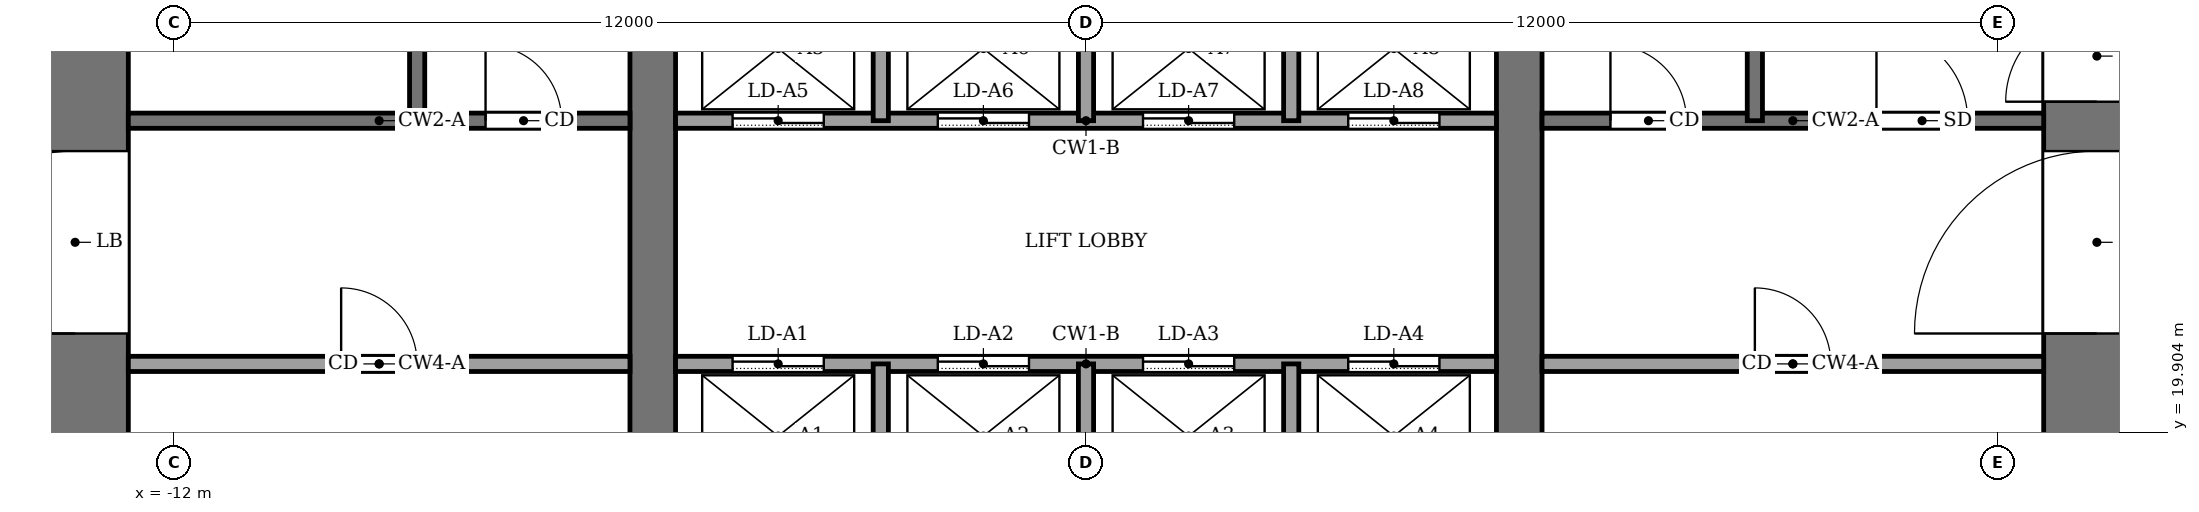
"""IFC4 building model, lengths in metres.
Left out: names, types, materials, properties, quantities, classifications, styles, units other than length and angle.
Written with IfcOpenShell. Run it as: python <this file> out.ifc"""

import sys

from ifc_helpers import new_model, si_unit, direction, frame, frame_2d, origin, place, context, subcontext, project, spatial, rectangle, extrude, element, fill, save


model = new_model("IFC4")
c1 = context("Model", 3, precision=1e-05, world=origin(), true_north=direction((0.0, 1.0)))
c2 = subcontext(c1, "Body", "Model", "MODEL_VIEW")
j1 = project(units=[si_unit("LENGTHUNIT", "METRE"), si_unit("PLANEANGLEUNIT", "RADIAN")], contexts=[c1])
p1 = place(None, origin())
s1 = spatial("IfcSite", under=j1, at=p1, CompositionType="ELEMENT")
p2 = place(p1, origin())
s2 = spatial("IfcBuilding", under=s1, at=p2, CompositionType="ELEMENT")
p3 = place(p2, origin())
s3 = spatial("IfcBuildingStorey", under=s2, at=p3, CompositionType="ELEMENT", Elevation=0.0)
p4 = place(p3, frame((-13.3, 18.4, -0.45), z_axis=(0.0, 0.0, 1.0), x_axis=(0.0, 1.0, 0.0)))
e1 = element("IfcWall", 1, at=p4, inside=s3, PredefinedType="SHEAR", context=c2, shape_type="SweptSolid", body=[
    extrude(rectangle(XDim=19.2, YDim=1.4, at=frame_2d((9.6, 0.0))), origin(), (0.0, 0.0, 1.0), 9.32),
])
p5 = place(p4, frame((2.8, 0.0, 0.45)))
e2 = element("IfcOpeningElement", 2, at=p5, cuts=e1, PredefinedType="OPENING", context=c2, shape_type="SweptSolid", body=[
    extrude(rectangle(XDim=2.4, YDim=2.4, at=frame_2d((1.2, 1.2))), frame((0.0, 0.71, 0.0), z_axis=(0.0, -1.0, 0.0), x_axis=(1.0, 0.0, 0.0)), (0.0, 0.0, 1.0), 1.42),
])
p6 = place(p4, frame((13.4, 0.0, 0.45)))
e3 = element("IfcOpeningElement", 3, at=p6, cuts=e1, PredefinedType="OPENING", context=c2, shape_type="SweptSolid", body=[
    extrude(rectangle(XDim=1.4, YDim=2.2, at=frame_2d((0.7, 1.1))), frame((0.0, 0.71, 0.0), z_axis=(0.0, -1.0, 0.0), x_axis=(1.0, 0.0, 0.0)), (0.0, 0.0, 1.0), 1.42),
])
p7 = place(p4, frame((11.3, 0.0, 0.45)))
e4 = element("IfcOpeningElement", 4, at=p7, cuts=e1, PredefinedType="OPENING", context=c2, shape_type="SweptSolid", body=[
    extrude(rectangle(XDim=1.2, YDim=2.2, at=frame_2d((0.6, 1.1))), frame((0.0, 0.71, 0.0), z_axis=(0.0, -1.0, 0.0), x_axis=(1.0, 0.0, 0.0)), (0.0, 0.0, 1.0), 1.42),
])
p8 = place(p3, frame((13.3, 18.4, -0.45), z_axis=(0.0, 0.0, 1.0), x_axis=(0.0, 1.0, 0.0)))
e5 = element("IfcWall", 5, at=p8, inside=s3, PredefinedType="SHEAR", context=c2, shape_type="SweptSolid", body=[
    extrude(rectangle(XDim=19.2, YDim=1.4, at=frame_2d((9.6, 0.0))), origin(), (0.0, 0.0, 1.0), 9.32),
])
p9 = place(p8, frame((2.8, 0.0, 0.45)))
e6 = element("IfcOpeningElement", 6, at=p9, cuts=e5, PredefinedType="OPENING", context=c2, shape_type="SweptSolid", body=[
    extrude(rectangle(XDim=2.4, YDim=2.4, at=frame_2d((1.2, 1.2))), frame((0.0, 0.71, 0.0), z_axis=(0.0, -1.0, 0.0), x_axis=(1.0, 0.0, 0.0)), (0.0, 0.0, 1.0), 1.42),
])
p10 = place(p8, frame((13.3, 0.0, 0.45)))
e7 = element("IfcOpeningElement", 7, at=p10, cuts=e5, PredefinedType="OPENING", context=c2, shape_type="SweptSolid", body=[
    extrude(rectangle(XDim=2.4, YDim=2.4, at=frame_2d((1.2, 1.2))), frame((0.0, 0.71, 0.0), z_axis=(0.0, -1.0, 0.0), x_axis=(1.0, 0.0, 0.0)), (0.0, 0.0, 1.0), 1.42),
])
p11 = place(p8, frame((5.85, 0.0, 0.45)))
e8 = element("IfcOpeningElement", 8, at=p11, cuts=e5, PredefinedType="OPENING", context=c2, shape_type="SweptSolid", body=[
    extrude(rectangle(XDim=1.2, YDim=2.2, at=frame_2d((0.6, 1.1))), frame((0.0, 0.71, 0.0), z_axis=(0.0, -1.0, 0.0), x_axis=(1.0, 0.0, 0.0)), (0.0, 0.0, 1.0), 1.42),
])
p12 = place(p8, frame((16.8, 0.0, 0.45)))
e9 = element("IfcOpeningElement", 9, at=p12, cuts=e5, PredefinedType="OPENING", context=c2, shape_type="SweptSolid", body=[
    extrude(rectangle(XDim=1.2, YDim=2.2, at=frame_2d((0.6, 1.1))), frame((0.0, 0.71, 0.0), z_axis=(0.0, -1.0, 0.0), x_axis=(1.0, 0.0, 0.0)), (0.0, 0.0, 1.0), 1.42),
])
p13 = place(p3, frame((-5.7, 18.4, -0.45), z_axis=(0.0, 0.0, 1.0), x_axis=(0.0, 1.0, 0.0)))
e10 = element("IfcWall", 10, at=p13, inside=s3, PredefinedType="SHEAR", context=c2, shape_type="SweptSolid", body=[
    extrude(rectangle(XDim=19.2, YDim=0.6, at=frame_2d((9.6, 0.0))), origin(), (0.0, 0.0, 1.0), 9.32),
])
p14 = place(p13, frame((8.35, 0.0, 0.45)))
e11 = element("IfcOpeningElement", 11, at=p14, cuts=e10, PredefinedType="OPENING", context=c2, shape_type="SweptSolid", body=[
    extrude(rectangle(XDim=0.9, YDim=2.1, at=frame_2d((0.45, 1.05))), frame((0.0, 0.31, 0.0), z_axis=(0.0, -1.0, 0.0), x_axis=(1.0, 0.0, 0.0)), (0.0, 0.0, 1.0), 0.62),
])
p15 = place(p3, frame((5.7, 18.4, -0.45), z_axis=(0.0, 0.0, 1.0), x_axis=(0.0, 1.0, 0.0)))
e12 = element("IfcWall", 12, at=p15, inside=s3, PredefinedType="SHEAR", context=c2, shape_type="SweptSolid", body=[
    extrude(rectangle(XDim=19.2, YDim=0.6, at=frame_2d((9.6, 0.0))), origin(), (0.0, 0.0, 1.0), 9.32),
])
p16 = place(p15, frame((13.3, 0.0, 0.45)))
e13 = element("IfcOpeningElement", 13, at=p16, cuts=e12, PredefinedType="OPENING", context=c2, shape_type="SweptSolid", body=[
    extrude(rectangle(XDim=2.4, YDim=2.4, at=frame_2d((1.2, 1.2))), frame((0.0, 0.31, 0.0), z_axis=(0.0, -1.0, 0.0), x_axis=(1.0, 0.0, 0.0)), (0.0, 0.0, 1.0), 0.62),
])
p17 = place(p3, frame((-12.6, 20.8, 0.0), z_axis=(0.0, 0.0, 1.0), x_axis=(1.0, 0.0, 0.0)))
e14 = element("IfcWall", 14, at=p17, inside=s3, PredefinedType="PARTITIONING", context=c2, shape_type="SweptSolid", body=[
    extrude(rectangle(XDim=6.6, YDim=0.2, at=frame_2d((3.3, 0.0))), origin(), (0.0, 0.0, 1.0), 8.87),
])
p18 = place(p17, frame((2.8, 0.0, 0.0)))
e15 = element("IfcOpeningElement", 15, at=p18, cuts=e14, PredefinedType="OPENING", context=c2, shape_type="SweptSolid", body=[
    extrude(rectangle(XDim=1.0, YDim=2.1, at=frame_2d((0.5, 1.05))), frame((0.0, 0.11, 0.0), z_axis=(0.0, -1.0, 0.0), x_axis=(1.0, 0.0, 0.0)), (0.0, 0.0, 1.0), 0.22),
])
p19 = place(p3, frame((-5.4, 20.8, 0.0), z_axis=(0.0, 0.0, 1.0), x_axis=(1.0, 0.0, 0.0)))
e16 = element("IfcWall", 16, at=p19, inside=s3, PredefinedType="PARTITIONING", context=c2, shape_type="SweptSolid", body=[
    extrude(rectangle(XDim=10.8, YDim=0.2, at=frame_2d((5.4, 0.0))), origin(), (0.0, 0.0, 1.0), 8.87),
])
p20 = place(p19, frame((0.75, 0.0, 0.0)))
e17 = element("IfcOpeningElement", 17, at=p20, cuts=e16, PredefinedType="OPENING", context=c2, shape_type="SweptSolid", body=[
    extrude(rectangle(XDim=1.2, YDim=2.2, at=frame_2d((0.6, 1.1))), frame((0.0, 0.11, 0.0), z_axis=(0.0, -1.0, 0.0), x_axis=(1.0, 0.0, 0.0)), (0.0, 0.0, 1.0), 0.22),
])
p21 = place(p19, frame((3.45, 0.0, 0.0)))
e18 = element("IfcOpeningElement", 18, at=p21, cuts=e16, PredefinedType="OPENING", context=c2, shape_type="SweptSolid", body=[
    extrude(rectangle(XDim=1.2, YDim=2.2, at=frame_2d((0.6, 1.1))), frame((0.0, 0.11, 0.0), z_axis=(0.0, -1.0, 0.0), x_axis=(1.0, 0.0, 0.0)), (0.0, 0.0, 1.0), 0.22),
])
p22 = place(p19, frame((6.15, 0.0, 0.0)))
e19 = element("IfcOpeningElement", 19, at=p22, cuts=e16, PredefinedType="OPENING", context=c2, shape_type="SweptSolid", body=[
    extrude(rectangle(XDim=1.2, YDim=2.2, at=frame_2d((0.6, 1.1))), frame((0.0, 0.11, 0.0), z_axis=(0.0, -1.0, 0.0), x_axis=(1.0, 0.0, 0.0)), (0.0, 0.0, 1.0), 0.22),
])
p23 = place(p19, frame((8.85, 0.0, 0.0)))
e20 = element("IfcOpeningElement", 20, at=p23, cuts=e16, PredefinedType="OPENING", context=c2, shape_type="SweptSolid", body=[
    extrude(rectangle(XDim=1.2, YDim=2.2, at=frame_2d((0.6, 1.1))), frame((0.0, 0.11, 0.0), z_axis=(0.0, -1.0, 0.0), x_axis=(1.0, 0.0, 0.0)), (0.0, 0.0, 1.0), 0.22),
])
p24 = place(p3, frame((6.0, 20.8, 0.0), z_axis=(0.0, 0.0, 1.0), x_axis=(1.0, 0.0, 0.0)))
e21 = element("IfcWall", 21, at=p24, inside=s3, PredefinedType="PARTITIONING", context=c2, shape_type="SweptSolid", body=[
    extrude(rectangle(XDim=6.6, YDim=0.2, at=frame_2d((3.3, 0.0))), origin(), (0.0, 0.0, 1.0), 8.87),
])
p25 = place(p24, frame((2.8, 0.0, 0.0)))
e22 = element("IfcOpeningElement", 22, at=p25, cuts=e21, PredefinedType="OPENING", context=c2, shape_type="SweptSolid", body=[
    extrude(rectangle(XDim=1.0, YDim=2.1, at=frame_2d((0.5, 1.05))), frame((0.0, 0.11, 0.0), z_axis=(0.0, -1.0, 0.0), x_axis=(1.0, 0.0, 0.0)), (0.0, 0.0, 1.0), 0.22),
])
p26 = place(p3, frame((-12.6, 24.0, 0.0), z_axis=(0.0, 0.0, 1.0), x_axis=(1.0, 0.0, 0.0)))
e23 = element("IfcWall", 23, at=p26, inside=s3, PredefinedType="PARTITIONING", context=c2, shape_type="SweptSolid", body=[
    extrude(rectangle(XDim=6.6, YDim=0.2, at=frame_2d((3.3, 0.0))), origin(), (0.0, 0.0, 1.0), 8.87),
])
p27 = place(p26, frame((4.7, 0.0, 0.0)))
e24 = element("IfcOpeningElement", 24, at=p27, cuts=e23, PredefinedType="OPENING", context=c2, shape_type="SweptSolid", body=[
    extrude(rectangle(XDim=1.0, YDim=2.1, at=frame_2d((0.5, 1.05))), frame((0.0, 0.11, 0.0), z_axis=(0.0, -1.0, 0.0), x_axis=(1.0, 0.0, 0.0)), (0.0, 0.0, 1.0), 0.22),
])
p28 = place(p3, frame((-5.4, 24.0, 0.0), z_axis=(0.0, 0.0, 1.0), x_axis=(1.0, 0.0, 0.0)))
e25 = element("IfcWall", 25, at=p28, inside=s3, PredefinedType="PARTITIONING", context=c2, shape_type="SweptSolid", body=[
    extrude(rectangle(XDim=10.8, YDim=0.2, at=frame_2d((5.4, 0.0))), origin(), (0.0, 0.0, 1.0), 8.87),
])
p29 = place(p28, frame((0.75, 0.0, 0.0)))
e26 = element("IfcOpeningElement", 26, at=p29, cuts=e25, PredefinedType="OPENING", context=c2, shape_type="SweptSolid", body=[
    extrude(rectangle(XDim=1.2, YDim=2.2, at=frame_2d((0.6, 1.1))), frame((0.0, 0.11, 0.0), z_axis=(0.0, -1.0, 0.0), x_axis=(1.0, 0.0, 0.0)), (0.0, 0.0, 1.0), 0.22),
])
p30 = place(p28, frame((3.45, 0.0, 0.0)))
e27 = element("IfcOpeningElement", 27, at=p30, cuts=e25, PredefinedType="OPENING", context=c2, shape_type="SweptSolid", body=[
    extrude(rectangle(XDim=1.2, YDim=2.2, at=frame_2d((0.6, 1.1))), frame((0.0, 0.11, 0.0), z_axis=(0.0, -1.0, 0.0), x_axis=(1.0, 0.0, 0.0)), (0.0, 0.0, 1.0), 0.22),
])
p31 = place(p28, frame((6.15, 0.0, 0.0)))
e28 = element("IfcOpeningElement", 28, at=p31, cuts=e25, PredefinedType="OPENING", context=c2, shape_type="SweptSolid", body=[
    extrude(rectangle(XDim=1.2, YDim=2.2, at=frame_2d((0.6, 1.1))), frame((0.0, 0.11, 0.0), z_axis=(0.0, -1.0, 0.0), x_axis=(1.0, 0.0, 0.0)), (0.0, 0.0, 1.0), 0.22),
])
p32 = place(p28, frame((8.85, 0.0, 0.0)))
e29 = element("IfcOpeningElement", 29, at=p32, cuts=e25, PredefinedType="OPENING", context=c2, shape_type="SweptSolid", body=[
    extrude(rectangle(XDim=1.2, YDim=2.2, at=frame_2d((0.6, 1.1))), frame((0.0, 0.11, 0.0), z_axis=(0.0, -1.0, 0.0), x_axis=(1.0, 0.0, 0.0)), (0.0, 0.0, 1.0), 0.22),
])
p33 = place(p3, frame((6.0, 24.0, 0.0), z_axis=(0.0, 0.0, 1.0), x_axis=(1.0, 0.0, 0.0)))
e30 = element("IfcWall", 30, at=p33, inside=s3, PredefinedType="PARTITIONING", context=c2, shape_type="SweptSolid", body=[
    extrude(rectangle(XDim=6.6, YDim=0.2, at=frame_2d((3.3, 0.0))), origin(), (0.0, 0.0, 1.0), 8.87),
])
p34 = place(p33, frame((0.9, 0.0, 0.0)))
e31 = element("IfcOpeningElement", 31, at=p34, cuts=e30, PredefinedType="OPENING", context=c2, shape_type="SweptSolid", body=[
    extrude(rectangle(XDim=1.0, YDim=2.1, at=frame_2d((0.5, 1.05))), frame((0.0, 0.11, 0.0), z_axis=(0.0, -1.0, 0.0), x_axis=(1.0, 0.0, 0.0)), (0.0, 0.0, 1.0), 0.22),
])
p35 = place(p33, frame((4.4, 0.0, 0.0)))
e32 = element("IfcOpeningElement", 32, at=p35, cuts=e30, PredefinedType="OPENING", context=c2, shape_type="SweptSolid", body=[
    extrude(rectangle(XDim=1.2, YDim=2.2, at=frame_2d((0.6, 1.1))), frame((0.0, 0.11, 0.0), z_axis=(0.0, -1.0, 0.0), x_axis=(1.0, 0.0, 0.0)), (0.0, 0.0, 1.0), 0.22),
])
p36 = place(p3, frame((-8.8, 24.0, 0.0), z_axis=(0.0, 0.0, 1.0), x_axis=(0.0, 1.0, 0.0)))
e33 = element("IfcWall", 33, at=p36, inside=s3, PredefinedType="PARTITIONING", context=c2, shape_type="SweptSolid", body=[
    extrude(rectangle(XDim=7.4, YDim=0.2, at=frame_2d((3.7, 0.0))), origin(), (0.0, 0.0, 1.0), 8.87),
])
p37 = place(p3, frame((-2.7, 18.4, 0.0), z_axis=(0.0, 0.0, 1.0), x_axis=(0.0, 1.0, 0.0)))
e34 = element("IfcWall", 34, at=p37, inside=s3, PredefinedType="PARTITIONING", context=c2, shape_type="SweptSolid", body=[
    extrude(rectangle(XDim=2.4, YDim=0.2, at=frame_2d((1.2, 0.0))), origin(), (0.0, 0.0, 1.0), 8.87),
])
p38 = place(p3, frame((-2.7, 24.0, 0.0), z_axis=(0.0, 0.0, 1.0), x_axis=(0.0, 1.0, 0.0)))
e35 = element("IfcWall", 35, at=p38, inside=s3, PredefinedType="PARTITIONING", context=c2, shape_type="SweptSolid", body=[
    extrude(rectangle(XDim=2.4, YDim=0.2, at=frame_2d((1.2, 0.0))), origin(), (0.0, 0.0, 1.0), 8.87),
])
p39 = place(p3, frame((0.0, 18.4, 0.0), z_axis=(0.0, 0.0, 1.0), x_axis=(0.0, 1.0, 0.0)))
e36 = element("IfcWall", 36, at=p39, inside=s3, PredefinedType="PARTITIONING", context=c2, shape_type="SweptSolid", body=[
    extrude(rectangle(XDim=2.4, YDim=0.2, at=frame_2d((1.2, 0.0))), origin(), (0.0, 0.0, 1.0), 8.87),
])
p40 = place(p3, frame((0.0, 24.0, 0.0), z_axis=(0.0, 0.0, 1.0), x_axis=(0.0, 1.0, 0.0)))
e37 = element("IfcWall", 37, at=p40, inside=s3, PredefinedType="PARTITIONING", context=c2, shape_type="SweptSolid", body=[
    extrude(rectangle(XDim=2.4, YDim=0.2, at=frame_2d((1.2, 0.0))), origin(), (0.0, 0.0, 1.0), 8.87),
])
p41 = place(p3, frame((2.7, 18.4, 0.0), z_axis=(0.0, 0.0, 1.0), x_axis=(0.0, 1.0, 0.0)))
e38 = element("IfcWall", 38, at=p41, inside=s3, PredefinedType="PARTITIONING", context=c2, shape_type="SweptSolid", body=[
    extrude(rectangle(XDim=2.4, YDim=0.2, at=frame_2d((1.2, 0.0))), origin(), (0.0, 0.0, 1.0), 8.87),
])
p42 = place(p3, frame((2.7, 24.0, 0.0), z_axis=(0.0, 0.0, 1.0), x_axis=(0.0, 1.0, 0.0)))
e39 = element("IfcWall", 39, at=p42, inside=s3, PredefinedType="PARTITIONING", context=c2, shape_type="SweptSolid", body=[
    extrude(rectangle(XDim=2.4, YDim=0.2, at=frame_2d((1.2, 0.0))), origin(), (0.0, 0.0, 1.0), 8.87),
])
p43 = place(p3, frame((8.8, 24.0, 0.0), z_axis=(0.0, 0.0, 1.0), x_axis=(0.0, 1.0, 0.0)))
e40 = element("IfcWall", 40, at=p43, inside=s3, PredefinedType="PARTITIONING", context=c2, shape_type="SweptSolid", body=[
    extrude(rectangle(XDim=7.4, YDim=0.2, at=frame_2d((3.7, 0.0))), origin(), (0.0, 0.0, 1.0), 8.87),
])
p44 = place(p20, origin())
e41 = element("IfcDoor", 41, at=p44, inside=s3, OperationType="SLIDING_TO_LEFT", PredefinedType="DOOR", context=c2, shape_type="SweptSolid", body=[
    extrude(rectangle(XDim=1.2, YDim=2.2, at=frame_2d((0.6, 1.1))), frame((0.0, 0.025, 0.0), z_axis=(0.0, -1.0, 0.0), x_axis=(1.0, 0.0, 0.0)), (0.0, 0.0, 1.0), 0.05),
])
fill(e17, e41)
p45 = place(p21, origin())
e42 = element("IfcDoor", 42, at=p45, inside=s3, OperationType="SLIDING_TO_LEFT", PredefinedType="DOOR", context=c2, shape_type="SweptSolid", body=[
    extrude(rectangle(XDim=1.2, YDim=2.2, at=frame_2d((0.6, 1.1))), frame((0.0, 0.025, 0.0), z_axis=(0.0, -1.0, 0.0), x_axis=(1.0, 0.0, 0.0)), (0.0, 0.0, 1.0), 0.05),
])
fill(e18, e42)
p46 = place(p22, origin())
e43 = element("IfcDoor", 43, at=p46, inside=s3, OperationType="SLIDING_TO_LEFT", PredefinedType="DOOR", context=c2, shape_type="SweptSolid", body=[
    extrude(rectangle(XDim=1.2, YDim=2.2, at=frame_2d((0.6, 1.1))), frame((0.0, 0.025, 0.0), z_axis=(0.0, -1.0, 0.0), x_axis=(1.0, 0.0, 0.0)), (0.0, 0.0, 1.0), 0.05),
])
fill(e19, e43)
p47 = place(p23, origin())
e44 = element("IfcDoor", 44, at=p47, inside=s3, OperationType="SLIDING_TO_LEFT", PredefinedType="DOOR", context=c2, shape_type="SweptSolid", body=[
    extrude(rectangle(XDim=1.2, YDim=2.2, at=frame_2d((0.6, 1.1))), frame((0.0, 0.025, 0.0), z_axis=(0.0, -1.0, 0.0), x_axis=(1.0, 0.0, 0.0)), (0.0, 0.0, 1.0), 0.05),
])
fill(e20, e44)
p48 = place(p29, origin())
e45 = element("IfcDoor", 45, at=p48, inside=s3, OperationType="SLIDING_TO_LEFT", PredefinedType="DOOR", context=c2, shape_type="SweptSolid", body=[
    extrude(rectangle(XDim=1.2, YDim=2.2, at=frame_2d((0.6, 1.1))), frame((0.0, 0.025, 0.0), z_axis=(0.0, -1.0, 0.0), x_axis=(1.0, 0.0, 0.0)), (0.0, 0.0, 1.0), 0.05),
])
fill(e26, e45)
p49 = place(p30, origin())
e46 = element("IfcDoor", 46, at=p49, inside=s3, OperationType="SLIDING_TO_LEFT", PredefinedType="DOOR", context=c2, shape_type="SweptSolid", body=[
    extrude(rectangle(XDim=1.2, YDim=2.2, at=frame_2d((0.6, 1.1))), frame((0.0, 0.025, 0.0), z_axis=(0.0, -1.0, 0.0), x_axis=(1.0, 0.0, 0.0)), (0.0, 0.0, 1.0), 0.05),
])
fill(e27, e46)
p50 = place(p31, origin())
e47 = element("IfcDoor", 47, at=p50, inside=s3, OperationType="SLIDING_TO_LEFT", PredefinedType="DOOR", context=c2, shape_type="SweptSolid", body=[
    extrude(rectangle(XDim=1.2, YDim=2.2, at=frame_2d((0.6, 1.1))), frame((0.0, 0.025, 0.0), z_axis=(0.0, -1.0, 0.0), x_axis=(1.0, 0.0, 0.0)), (0.0, 0.0, 1.0), 0.05),
])
fill(e28, e47)
p51 = place(p32, origin())
e48 = element("IfcDoor", 48, at=p51, inside=s3, OperationType="SLIDING_TO_LEFT", PredefinedType="DOOR", context=c2, shape_type="SweptSolid", body=[
    extrude(rectangle(XDim=1.2, YDim=2.2, at=frame_2d((0.6, 1.1))), frame((0.0, 0.025, 0.0), z_axis=(0.0, -1.0, 0.0), x_axis=(1.0, 0.0, 0.0)), (0.0, 0.0, 1.0), 0.05),
])
fill(e29, e48)
p52 = place(p18, origin())
e49 = element("IfcDoor", 49, at=p52, inside=s3, OperationType="SINGLE_SWING_LEFT", PredefinedType="DOOR", context=c2, shape_type="SweptSolid", body=[
    extrude(rectangle(XDim=1.0, YDim=2.1, at=frame_2d((0.5, 1.05))), frame((0.0, 0.025, 0.0), z_axis=(0.0, -1.0, 0.0), x_axis=(1.0, 0.0, 0.0)), (0.0, 0.0, 1.0), 0.05),
])
fill(e15, e49)
p53 = place(p25, origin())
e50 = element("IfcDoor", 50, at=p53, inside=s3, OperationType="SINGLE_SWING_RIGHT", PredefinedType="DOOR", context=c2, shape_type="SweptSolid", body=[
    extrude(rectangle(XDim=1.0, YDim=2.1, at=frame_2d((0.5, 1.05))), frame((0.0, 0.025, 0.0), z_axis=(0.0, -1.0, 0.0), x_axis=(1.0, 0.0, 0.0)), (0.0, 0.0, 1.0), 0.05),
])
fill(e22, e50)
p54 = place(p27, origin())
e51 = element("IfcDoor", 51, at=p54, inside=s3, OperationType="SINGLE_SWING_RIGHT", PredefinedType="DOOR", context=c2, shape_type="SweptSolid", body=[
    extrude(rectangle(XDim=1.0, YDim=2.1, at=frame_2d((0.5, 1.05))), frame((0.0, 0.025, 0.0), z_axis=(0.0, -1.0, 0.0), x_axis=(1.0, 0.0, 0.0)), (0.0, 0.0, 1.0), 0.05),
])
fill(e24, e51)
p55 = place(p34, origin())
e52 = element("IfcDoor", 52, at=p55, inside=s3, OperationType="SINGLE_SWING_LEFT", PredefinedType="DOOR", context=c2, shape_type="SweptSolid", body=[
    extrude(rectangle(XDim=1.0, YDim=2.1, at=frame_2d((0.5, 1.05))), frame((0.0, 0.025, 0.0), z_axis=(0.0, -1.0, 0.0), x_axis=(1.0, 0.0, 0.0)), (0.0, 0.0, 1.0), 0.05),
])
fill(e31, e52)
p56 = place(p35, origin())
e53 = element("IfcDoor", 53, at=p56, inside=s3, OperationType="SINGLE_SWING_LEFT", PredefinedType="DOOR", context=c2, shape_type="SweptSolid", body=[
    extrude(rectangle(XDim=1.2, YDim=2.2, at=frame_2d((0.6, 1.1))), frame((0.0, 0.025, 0.0), z_axis=(0.0, -1.0, 0.0), x_axis=(1.0, 0.0, 0.0)), (0.0, 0.0, 1.0), 0.05),
])
fill(e32, e53)
p57 = place(p5, origin())
e54 = element("IfcDoor", 54, at=p57, inside=s3, OperationType="DOUBLE_DOOR_SINGLE_SWING", PredefinedType="DOOR", context=c2, shape_type="SweptSolid", body=[
    extrude(rectangle(XDim=2.4, YDim=2.4, at=frame_2d((1.2, 1.2))), frame((0.0, 0.025, 0.0), z_axis=(0.0, -1.0, 0.0), x_axis=(1.0, 0.0, 0.0)), (0.0, 0.0, 1.0), 0.05),
])
fill(e2, e54)
p58 = place(p9, origin())
e55 = element("IfcDoor", 55, at=p58, inside=s3, OperationType="DOUBLE_DOOR_SINGLE_SWING", PredefinedType="DOOR", context=c2, shape_type="SweptSolid", body=[
    extrude(rectangle(XDim=2.4, YDim=2.4, at=frame_2d((1.2, 1.2))), frame((0.0, 0.025, 0.0), z_axis=(0.0, -1.0, 0.0), x_axis=(1.0, 0.0, 0.0)), (0.0, 0.0, 1.0), 0.05),
])
fill(e6, e55)
p59 = place(p11, origin())
e56 = element("IfcDoor", 56, at=p59, inside=s3, OperationType="SINGLE_SWING_LEFT", PredefinedType="DOOR", context=c2, shape_type="SweptSolid", body=[
    extrude(rectangle(XDim=1.2, YDim=2.2, at=frame_2d((0.6, 1.1))), frame((0.0, 0.7, 0.0), z_axis=(0.0, -1.0, 0.0), x_axis=(1.0, 0.0, 0.0)), (0.0, 0.0, 1.0), 0.05),
])
fill(e8, e56)
save(model, sys.argv[1])
